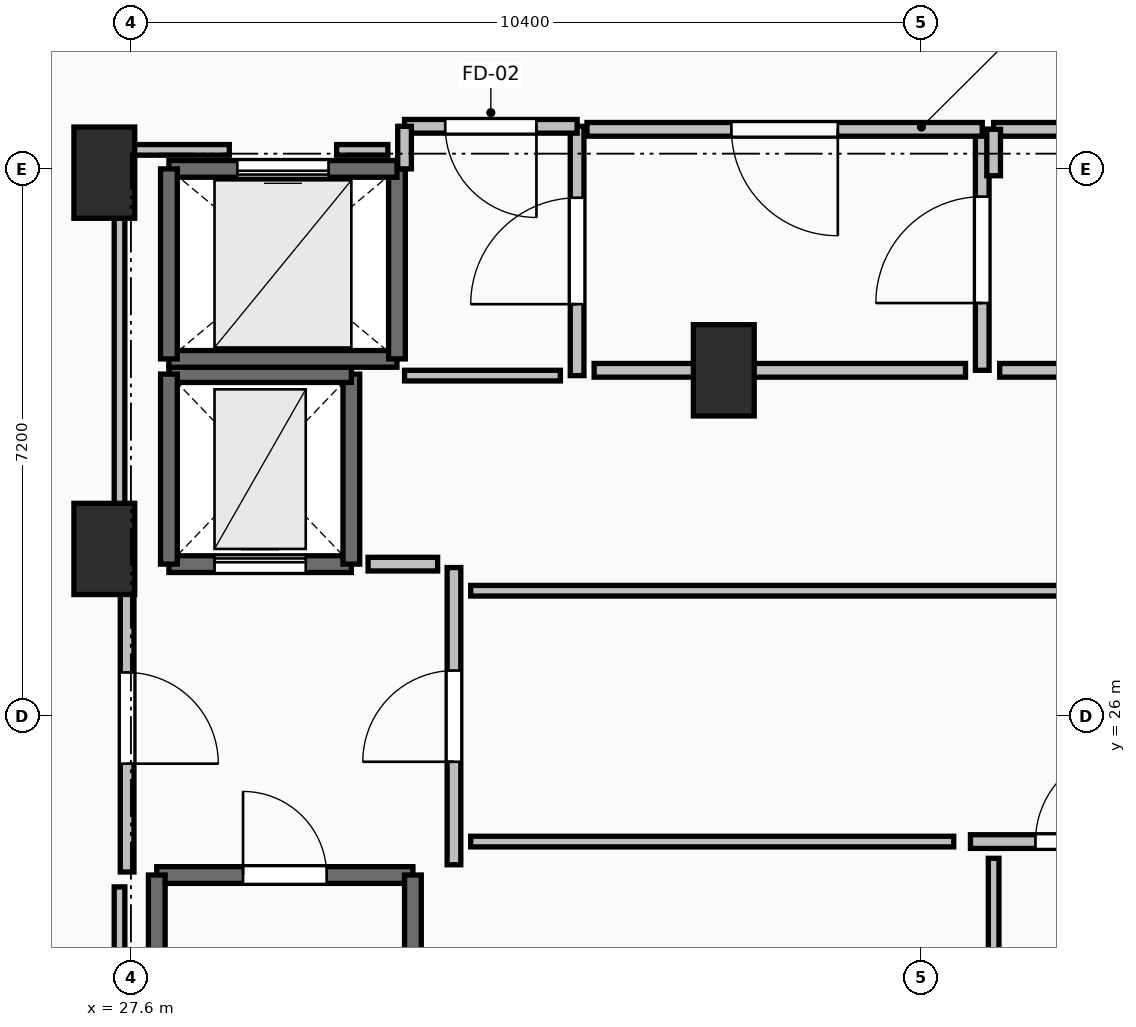
"""IFC4 building model, lengths in metres.
Left out: names, types, materials, properties, quantities, classifications, styles, units other than length and angle.
Written with IfcOpenShell. Run it as: python <this file> out.ifc"""

import sys

from ifc_helpers import new_model, si_unit, direction, frame, frame_2d, origin, origin_2d, place, context, subcontext, project, spatial, rectangle, extrude, element, fill, save


model = new_model("IFC4")
c1 = context("Model", 3, precision=1e-05, world=origin(), true_north=direction((0.0, 1.0)))
c2 = subcontext(c1, "Body", "Model", "MODEL_VIEW")
j1 = project(units=[si_unit("LENGTHUNIT", "METRE"), si_unit("PLANEANGLEUNIT", "RADIAN")], contexts=[c1])
p1 = place(None, origin())
s1 = spatial("IfcSite", under=j1, at=p1, CompositionType="ELEMENT")
p2 = place(p1, origin())
s2 = spatial("IfcBuilding", under=s1, at=p2, CompositionType="ELEMENT")
p3 = place(p2, frame((0.0, 0.0, -4.8)))
s3 = spatial("IfcBuildingStorey", under=s2, at=p3, CompositionType="ELEMENT", Elevation=-4.8)
for number, where, z_axis, x_axis in (
    (1, (27.25, 28.2, 0.0), (0.0, 0.0, 1.0), (1.0, 0.0, 0.0)),
    (2, (27.25, 33.15, 0.0), (0.0, 0.0, 1.0), (1.0, 0.0, 0.0)),
    (3, (35.4, 30.55, 0.0), (0.0, 0.0, 1.0), (1.0, 0.0, 0.0)),
):
    element("IfcColumn", number, at=place(p3, frame(where, z_axis=z_axis, x_axis=x_axis)), inside=s3, PredefinedType="PILASTER", context=c2, shape_type="SweptSolid", body=[
        extrude(rectangle(XDim=0.8, YDim=1.2, at=origin_2d()), origin(), (0.0, 0.0, 1.0), 4.8),
    ])
p4 = place(p3, frame((27.94, 23.91, 0.0), z_axis=(0.0, 0.0, 1.0), x_axis=(1.0, 0.0, 0.0)))
e4 = element("IfcWall", 4, at=p4, inside=s3, PredefinedType="SOLIDWALL", context=c2, shape_type="SweptSolid", body=[
    extrude(rectangle(XDim=3.37, YDim=0.22, at=frame_2d((1.685, 0.0))), origin(), (0.0, 0.0, 1.0), 4.46),
])
p5 = place(p4, frame((1.135, 0.0, 0.0)))
e5 = element("IfcOpeningElement", 5, at=p5, cuts=e4, PredefinedType="OPENING", context=c2, shape_type="SweptSolid", body=[
    extrude(rectangle(XDim=1.1, YDim=2.15, at=frame_2d((0.55, 1.075))), frame((0.0, 0.125, 0.0), z_axis=(0.0, -1.0, 0.0), x_axis=(1.0, 0.0, 0.0)), (0.0, 0.0, 1.0), 0.25),
])
for number, where, z_axis, x_axis in (
    (6, (31.31, 23.91, 0.0), (0.0, 0.0, 1.0), (0.0, -1.0, 0.0)),
    (7, (27.94, 16.49, 0.0), (0.0, 0.0, 1.0), (0.0, 1.0, 0.0)),
):
    element("IfcWall", number, at=place(p3, frame(where, z_axis=z_axis, x_axis=x_axis)), inside=s3, PredefinedType="SOLIDWALL", context=c2, shape_type="SweptSolid", body=[
        extrude(rectangle(XDim=7.42, YDim=0.22, at=frame_2d((3.71, 0.0))), origin(), (0.0, 0.0, 1.0), 4.46),
    ])
p6 = place(p3, frame((28.1, 28.0, 0.0), z_axis=(0.0, 0.0, 1.0), x_axis=(1.0, 0.0, 0.0)))
e8 = element("IfcWall", 8, at=p6, inside=s3, PredefinedType="SHEAR", context=c2, shape_type="SweptSolid", body=[
    extrude(rectangle(XDim=2.4, YDim=0.22, at=frame_2d((1.2, 0.0))), origin(), (0.0, 0.0, 1.0), 4.46),
])
p7 = place(p6, frame((0.6, 0.0, 0.0)))
e9 = element("IfcOpeningElement", 9, at=p7, cuts=e8, PredefinedType="OPENING", context=c2, shape_type="SweptSolid", body=[
    extrude(rectangle(XDim=1.2, YDim=2.2, at=frame_2d((0.6, 1.1))), frame((0.0, 0.125, 0.0), z_axis=(0.0, -1.0, 0.0), x_axis=(1.0, 0.0, 0.0)), (0.0, 0.0, 1.0), 0.25),
])
p8 = place(p3, frame((30.5, 28.0, 0.0), z_axis=(0.0, 0.0, 1.0), x_axis=(0.0, 1.0, 0.0)))
e10 = element("IfcWall", 10, at=p8, inside=s3, PredefinedType="SHEAR", context=c2, shape_type="SweptSolid", body=[
    extrude(rectangle(XDim=2.5, YDim=0.22, at=frame_2d((1.25, 0.0))), origin(), (0.0, 0.0, 1.0), 4.46),
])
p9 = place(p3, frame((30.5, 30.5, 0.0), z_axis=(0.0, 0.0, 1.0), x_axis=(-1.0, 0.0, 0.0)))
e11 = element("IfcWall", 11, at=p9, inside=s3, PredefinedType="SHEAR", context=c2, shape_type="SweptSolid", body=[
    extrude(rectangle(XDim=2.4, YDim=0.22, at=frame_2d((1.2, 0.0))), origin(), (0.0, 0.0, 1.0), 4.46),
])
p10 = place(p3, frame((28.1, 30.5, 0.0), z_axis=(0.0, 0.0, 1.0), x_axis=(0.0, -1.0, 0.0)))
e12 = element("IfcWall", 12, at=p10, inside=s3, PredefinedType="SHEAR", context=c2, shape_type="SweptSolid", body=[
    extrude(rectangle(XDim=2.5, YDim=0.22, at=frame_2d((1.25, 0.0))), origin(), (0.0, 0.0, 1.0), 4.46),
])
p11 = place(p3, frame((28.1, 30.7, 0.0), z_axis=(0.0, 0.0, 1.0), x_axis=(1.0, 0.0, 0.0)))
e13 = element("IfcWall", 13, at=p11, inside=s3, PredefinedType="SOLIDWALL", context=c2, shape_type="SweptSolid", body=[
    extrude(rectangle(XDim=3.0, YDim=0.22, at=frame_2d((1.5, 0.0))), origin(), (0.0, 0.0, 1.0), 4.46),
])
p12 = place(p3, frame((31.1, 30.7, 0.0), z_axis=(0.0, 0.0, 1.0), x_axis=(0.0, 1.0, 0.0)))
e14 = element("IfcWall", 14, at=p12, inside=s3, PredefinedType="SOLIDWALL", context=c2, shape_type="SweptSolid", body=[
    extrude(rectangle(XDim=2.5, YDim=0.22, at=frame_2d((1.25, 0.0))), origin(), (0.0, 0.0, 1.0), 4.46),
])
p13 = place(p3, frame((31.1, 33.2, 0.0), z_axis=(0.0, 0.0, 1.0), x_axis=(-1.0, 0.0, 0.0)))
e15 = element("IfcWall", 15, at=p13, inside=s3, PredefinedType="SOLIDWALL", context=c2, shape_type="SweptSolid", body=[
    extrude(rectangle(XDim=3.0, YDim=0.22, at=frame_2d((1.5, 0.0))), origin(), (0.0, 0.0, 1.0), 4.46),
])
p14 = place(p13, frame((0.9, 0.0, 0.0)))
e16 = element("IfcOpeningElement", 16, at=p14, cuts=e15, PredefinedType="OPENING", context=c2, shape_type="SweptSolid", body=[
    extrude(rectangle(XDim=1.2, YDim=2.2, at=frame_2d((0.6, 1.1))), frame((0.0, 0.125, 0.0), z_axis=(0.0, -1.0, 0.0), x_axis=(1.0, 0.0, 0.0)), (0.0, 0.0, 1.0), 0.25),
])
p15 = place(p3, frame((28.1, 33.2, 0.0), z_axis=(0.0, 0.0, 1.0), x_axis=(0.0, -1.0, 0.0)))
e17 = element("IfcWall", 17, at=p15, inside=s3, PredefinedType="SOLIDWALL", context=c2, shape_type="SweptSolid", body=[
    extrude(rectangle(XDim=2.5, YDim=0.22, at=frame_2d((1.25, 0.0))), origin(), (0.0, 0.0, 1.0), 4.46),
])
p16 = place(p3, frame((31.85, 24.045, 0.0), z_axis=(0.0, 0.0, 1.0), x_axis=(0.0, 1.0, 0.0)))
e18 = element("IfcWall", 18, at=p16, inside=s3, PredefinedType="PARTITIONING", context=c2, shape_type="SweptSolid", body=[
    extrude(rectangle(XDim=3.91, YDim=0.18, at=frame_2d((1.955, 0.0))), origin(), (0.0, 0.0, 1.0), 4.46),
])
p17 = place(p16, frame((1.355, 0.0, 0.0)))
e19 = element("IfcOpeningElement", 19, at=p17, cuts=e18, PredefinedType="OPENING", context=c2, shape_type="SweptSolid", body=[
    extrude(rectangle(XDim=1.2, YDim=2.15, at=frame_2d((0.6, 1.075))), frame((0.0, 0.105, 0.0), z_axis=(0.0, -1.0, 0.0), x_axis=(1.0, 0.0, 0.0)), (0.0, 0.0, 1.0), 0.21),
])
p18 = place(p3, frame((27.55, 28.0, 0.0), z_axis=(0.0, 0.0, 1.0), x_axis=(0.0, -1.0, 0.0)))
e20 = element("IfcWall", 20, at=p18, inside=s3, PredefinedType="PARTITIONING", context=c2, shape_type="SweptSolid", body=[
    extrude(rectangle(XDim=4.05, YDim=0.18, at=frame_2d((2.025, 0.0))), origin(), (0.0, 0.0, 1.0), 3.04),
])
p19 = place(p18, frame((1.425, 0.0, 0.0)))
e21 = element("IfcOpeningElement", 21, at=p19, cuts=e20, PredefinedType="OPENING", context=c2, shape_type="SweptSolid", body=[
    extrude(rectangle(XDim=1.2, YDim=2.15, at=frame_2d((0.6, 1.075))), frame((0.0, 0.105, 0.0), z_axis=(0.0, -1.0, 0.0), x_axis=(1.0, 0.0, 0.0)), (0.0, 0.0, 1.0), 0.21),
])
p20 = place(p3, frame((33.47, 30.48, 0.0), z_axis=(0.0, 0.0, 1.0), x_axis=(0.0, 1.0, 0.0)))
e22 = element("IfcWall", 22, at=p20, inside=s3, PredefinedType="PARTITIONING", context=c2, shape_type="SweptSolid", body=[
    extrude(rectangle(XDim=3.28, YDim=0.18, at=frame_2d((1.64, 0.0))), origin(), (0.0, 0.0, 1.0), 4.46),
])
p21 = place(p20, frame((0.94, 0.0, 0.0)))
e23 = element("IfcOpeningElement", 23, at=p21, cuts=e22, PredefinedType="OPENING", context=c2, shape_type="SweptSolid", body=[
    extrude(rectangle(XDim=1.4, YDim=2.2, at=frame_2d((0.7, 1.1))), frame((0.0, 0.105, 0.0), z_axis=(0.0, -1.0, 0.0), x_axis=(1.0, 0.0, 0.0)), (0.0, 0.0, 1.0), 0.21),
])
p22 = place(p3, frame((33.47, 33.76, 0.0), z_axis=(0.0, 0.0, 1.0), x_axis=(-1.0, 0.0, 0.0)))
e24 = element("IfcWall", 24, at=p22, inside=s3, PredefinedType="PARTITIONING", context=c2, shape_type="SweptSolid", body=[
    extrude(rectangle(XDim=2.27, YDim=0.18, at=frame_2d((1.135, 0.0))), origin(), (0.0, 0.0, 1.0), 4.46),
])
p23 = place(p22, frame((0.535, 0.0, 0.0)))
e25 = element("IfcOpeningElement", 25, at=p23, cuts=e24, PredefinedType="OPENING", context=c2, shape_type="SweptSolid", body=[
    extrude(rectangle(XDim=1.2, YDim=2.15, at=frame_2d((0.6, 1.075))), frame((0.0, 0.105, 0.0), z_axis=(0.0, -1.0, 0.0), x_axis=(1.0, 0.0, 0.0)), (0.0, 0.0, 1.0), 0.21),
])
p24 = place(p3, frame((31.2, 33.76, 0.0), z_axis=(0.0, 0.0, 1.0), x_axis=(0.0, -1.0, 0.0)))
e26 = element("IfcWall", 26, at=p24, inside=s3, PredefinedType="PARTITIONING", context=c2, shape_type="SweptSolid", body=[
    extrude(rectangle(XDim=0.56, YDim=0.18, at=frame_2d((0.28, 0.0))), origin(), (0.0, 0.0, 1.0), 4.46),
])
p25 = place(p3, frame((38.645, 24.35, 0.0), z_axis=(0.0, 0.0, 1.0), x_axis=(1.0, 0.0, 0.0)))
e27 = element("IfcWall", 27, at=p25, inside=s3, PredefinedType="PARTITIONING", context=c2, shape_type="SweptSolid", body=[
    extrude(rectangle(XDim=2.91, YDim=0.18, at=frame_2d((1.455, 0.0))), origin(), (0.0, 0.0, 1.0), 4.46),
])
p26 = place(p25, frame((0.855, 0.0, 0.0)))
e28 = element("IfcOpeningElement", 28, at=p26, cuts=e27, PredefinedType="OPENING", context=c2, shape_type="SweptSolid", body=[
    extrude(rectangle(XDim=1.2, YDim=2.15, at=frame_2d((0.6, 1.075))), frame((0.0, 0.105, 0.0), z_axis=(0.0, -1.0, 0.0), x_axis=(1.0, 0.0, 0.0)), (0.0, 0.0, 1.0), 0.21),
])
p27 = place(p3, frame((38.8, 30.55, 0.0), z_axis=(0.0, 0.0, 1.0), x_axis=(0.0, 1.0, 0.0)))
e29 = element("IfcWall", 29, at=p27, inside=s3, PredefinedType="PARTITIONING", context=c2, shape_type="SweptSolid", body=[
    extrude(rectangle(XDim=3.17, YDim=0.18, at=frame_2d((1.585, 0.0))), origin(), (0.0, 0.0, 1.0), 3.04),
])
p28 = place(p27, frame((0.885, 0.0, 0.0)))
e30 = element("IfcOpeningElement", 30, at=p28, cuts=e29, PredefinedType="OPENING", context=c2, shape_type="SweptSolid", body=[
    extrude(rectangle(XDim=1.4, YDim=2.2, at=frame_2d((0.7, 1.1))), frame((0.0, 0.105, 0.0), z_axis=(0.0, -1.0, 0.0), x_axis=(1.0, 0.0, 0.0)), (0.0, 0.0, 1.0), 0.21),
])
p29 = place(p3, frame((38.8, 33.72, 0.0), z_axis=(0.0, 0.0, 1.0), x_axis=(-1.0, 0.0, 0.0)))
e31 = element("IfcWall", 31, at=p29, inside=s3, PredefinedType="PARTITIONING", context=c2, shape_type="SweptSolid", body=[
    extrude(rectangle(XDim=5.2, YDim=0.18, at=frame_2d((2.6, 0.0))), origin(), (0.0, 0.0, 1.0), 4.46),
])
p30 = place(p29, frame((1.9, 0.0, 0.0)))
e32 = element("IfcOpeningElement", 32, at=p30, cuts=e31, PredefinedType="OPENING", context=c2, shape_type="SweptSolid", body=[
    extrude(rectangle(XDim=1.4, YDim=2.2, at=frame_2d((0.7, 1.1))), frame((0.0, 0.105, 0.0), z_axis=(0.0, -1.0, 0.0), x_axis=(1.0, 0.0, 0.0)), (0.0, 0.0, 1.0), 0.21),
])
p31 = place(p3, frame((44.2, 33.72, 0.0), z_axis=(0.0, 0.0, 1.0), x_axis=(-1.0, 0.0, 0.0)))
e33 = element("IfcWall", 33, at=p31, inside=s3, PredefinedType="PARTITIONING", context=c2, shape_type="SweptSolid", body=[
    extrude(rectangle(XDim=5.25, YDim=0.18, at=frame_2d((2.625, 0.0))), origin(), (0.0, 0.0, 1.0), 4.46),
])
p32 = place(p31, frame((1.925, 0.0, 0.0)))
e34 = element("IfcOpeningElement", 34, at=p32, cuts=e33, PredefinedType="OPENING", context=c2, shape_type="SweptSolid", body=[
    extrude(rectangle(XDim=1.4, YDim=2.2, at=frame_2d((0.7, 1.1))), frame((0.0, 0.105, 0.0), z_axis=(0.0, -1.0, 0.0), x_axis=(1.0, 0.0, 0.0)), (0.0, 0.0, 1.0), 0.21),
])
p33 = place(p3, frame((38.95, 33.72, 0.0), z_axis=(0.0, 0.0, 1.0), x_axis=(0.0, -1.0, 0.0)))
e35 = element("IfcWall", 35, at=p33, inside=s3, PredefinedType="PARTITIONING", context=c2, shape_type="SweptSolid", body=[
    extrude(rectangle(XDim=0.61, YDim=0.18, at=frame_2d((0.305, 0.0))), origin(), (0.0, 0.0, 1.0), 4.46),
])
p34 = place(p3, frame((31.635, 28.0, 0.0), z_axis=(0.0, 0.0, 1.0), x_axis=(-1.0, 0.0, 0.0)))
e36 = element("IfcWall", 36, at=p34, inside=s3, PredefinedType="PARTITIONING", context=c2, shape_type="SweptSolid", body=[
    extrude(rectangle(XDim=0.915, YDim=0.18, at=frame_2d((0.458, 0.0))), origin(), (0.0, 0.0, 1.0), 4.46),
])
p35 = place(p3, frame((31.2, 30.48, 0.0), z_axis=(0.0, 0.0, 1.0), x_axis=(1.0, 0.0, 0.0)))
e37 = element("IfcWall", 37, at=p35, inside=s3, PredefinedType="PARTITIONING", context=c2, shape_type="SweptSolid", body=[
    extrude(rectangle(XDim=2.05, YDim=0.14, at=frame_2d((1.025, 0.0))), origin(), (0.0, 0.0, 1.0), 4.46),
])
p36 = place(p3, frame((43.93, 27.65, 0.0), z_axis=(0.0, 0.0, 1.0), x_axis=(-1.0, 0.0, 0.0)))
e38 = element("IfcWall", 38, at=p36, inside=s3, PredefinedType="PARTITIONING", context=c2, shape_type="SweptSolid", body=[
    extrude(rectangle(XDim=11.86, YDim=0.14, at=frame_2d((5.93, 0.0))), origin(), (0.0, 0.0, 1.0), 4.46),
])
p37 = place(p3, frame((32.07, 24.35, 0.0), z_axis=(0.0, 0.0, 1.0), x_axis=(1.0, 0.0, 0.0)))
e39 = element("IfcWall", 39, at=p37, inside=s3, PredefinedType="PARTITIONING", context=c2, shape_type="SweptSolid", body=[
    extrude(rectangle(XDim=6.355, YDim=0.14, at=frame_2d((3.177, 0.0))), origin(), (0.0, 0.0, 1.0), 4.46),
])
p38 = place(p3, frame((38.95, 24.13, 0.0), z_axis=(0.0, 0.0, 1.0), x_axis=(0.0, -1.0, 0.0)))
e40 = element("IfcWall", 40, at=p38, inside=s3, PredefinedType="PARTITIONING", context=c2, shape_type="SweptSolid", body=[
    extrude(rectangle(XDim=2.155, YDim=0.14, at=frame_2d((1.077, 0.0))), origin(), (0.0, 0.0, 1.0), 4.46),
])
p39 = place(p3, frame((33.694, 30.55, 0.0), z_axis=(0.0, 0.0, 1.0), x_axis=(1.0, 0.0, 0.0)))
e41 = element("IfcWall", 41, at=p39, inside=s3, PredefinedType="PARTITIONING", context=c2, shape_type="SweptSolid", body=[
    extrude(rectangle(XDim=4.886, YDim=0.18, at=frame_2d((2.443, 0.0))), origin(), (0.0, 0.0, 1.0), 3.04),
])
p40 = place(p3, frame((39.03, 30.55, 0.0), z_axis=(0.0, 0.0, 1.0), x_axis=(1.0, 0.0, 0.0)))
e42 = element("IfcWall", 42, at=p40, inside=s3, PredefinedType="PARTITIONING", context=c2, shape_type="SweptSolid", body=[
    extrude(rectangle(XDim=5.17, YDim=0.18, at=frame_2d((2.585, 0.0))), origin(), (0.0, 0.0, 1.0), 3.04),
])
p41 = place(p3, frame((27.45, 16.24, 0.0), z_axis=(0.0, 0.0, 1.0), x_axis=(0.0, 1.0, 0.0)))
e43 = element("IfcWall", 43, at=p41, inside=s3, PredefinedType="PARTITIONING", context=c2, shape_type="SweptSolid", body=[
    extrude(rectangle(XDim=7.514, YDim=0.14, at=frame_2d((3.757, 0.0))), origin(), (0.0, 0.0, 1.0), 3.04),
])
p42 = place(p3, frame((27.45, 28.196, 0.0), z_axis=(0.0, 0.0, 1.0), x_axis=(0.0, 1.0, 0.0)))
e44 = element("IfcWall", 44, at=p42, inside=s3, PredefinedType="PARTITIONING", context=c2, shape_type="SweptSolid", body=[
    extrude(rectangle(XDim=5.254, YDim=0.14, at=frame_2d((2.627, 0.0))), origin(), (0.0, 0.0, 1.0), 3.04),
])
p43 = place(p3, frame((27.45, 33.45, 0.0), z_axis=(0.0, 0.0, 1.0), x_axis=(1.0, 0.0, 0.0)))
e45 = element("IfcWall", 45, at=p43, inside=s3, PredefinedType="PARTITIONING", context=c2, shape_type="SweptSolid", body=[
    extrude(rectangle(XDim=1.444, YDim=0.14, at=frame_2d((0.722, 0.0))), origin(), (0.0, 0.0, 1.0), 4.46),
])
p44 = place(p3, frame((30.306, 33.45, 0.0), z_axis=(0.0, 0.0, 1.0), x_axis=(1.0, 0.0, 0.0)))
e46 = element("IfcWall", 46, at=p44, inside=s3, PredefinedType="PARTITIONING", context=c2, shape_type="SweptSolid", body=[
    extrude(rectangle(XDim=0.674, YDim=0.14, at=frame_2d((0.337, 0.0))), origin(), (0.0, 0.0, 1.0), 4.46),
])
p45 = place(p5, origin())
e47 = element("IfcDoor", 47, at=p45, inside=s3, OperationType="SINGLE_SWING_LEFT", PredefinedType="DOOR", context=c2, shape_type="SweptSolid", body=[
    extrude(rectangle(XDim=1.1, YDim=2.15, at=frame_2d((0.55, 1.075))), frame((0.0, 0.025, 0.0), z_axis=(0.0, -1.0, 0.0), x_axis=(1.0, 0.0, 0.0)), (0.0, 0.0, 1.0), 0.05),
])
fill(e5, e47)
p46 = place(p7, origin())
e48 = element("IfcDoor", 48, at=p46, inside=s3, OperationType="SLIDING_TO_LEFT", PredefinedType="DOOR", context=c2, shape_type="SweptSolid", body=[
    extrude(rectangle(XDim=1.2, YDim=2.2, at=frame_2d((0.6, 1.1))), frame((0.0, 0.025, 0.0), z_axis=(0.0, -1.0, 0.0), x_axis=(1.0, 0.0, 0.0)), (0.0, 0.0, 1.0), 0.05),
])
fill(e9, e48)
p47 = place(p14, origin())
e49 = element("IfcDoor", 49, at=p47, inside=s3, OperationType="SLIDING_TO_LEFT", PredefinedType="DOOR", context=c2, shape_type="SweptSolid", body=[
    extrude(rectangle(XDim=1.2, YDim=2.2, at=frame_2d((0.6, 1.1))), frame((0.0, 0.025, 0.0), z_axis=(0.0, -1.0, 0.0), x_axis=(1.0, 0.0, 0.0)), (0.0, 0.0, 1.0), 0.05),
])
fill(e16, e49)
p48 = place(p17, origin())
e50 = element("IfcDoor", 50, at=p48, inside=s3, OperationType="SINGLE_SWING_LEFT", PredefinedType="DOOR", context=c2, shape_type="SweptSolid", body=[
    extrude(rectangle(XDim=1.2, YDim=2.15, at=frame_2d((0.6, 1.075))), frame((0.0, 0.025, 0.0), z_axis=(0.0, -1.0, 0.0), x_axis=(1.0, 0.0, 0.0)), (0.0, 0.0, 1.0), 0.05),
])
fill(e19, e50)
p49 = place(p19, origin())
e51 = element("IfcDoor", 51, at=p49, inside=s3, OperationType="SINGLE_SWING_RIGHT", PredefinedType="DOOR", context=c2, shape_type="SweptSolid", body=[
    extrude(rectangle(XDim=1.2, YDim=2.15, at=frame_2d((0.6, 1.075))), frame((0.0, 0.025, 0.0), z_axis=(0.0, -1.0, 0.0), x_axis=(1.0, 0.0, 0.0)), (0.0, 0.0, 1.0), 0.05),
])
fill(e21, e51)
p50 = place(p21, origin())
e52 = element("IfcDoor", 52, at=p50, inside=s3, OperationType="DOUBLE_SWING_LEFT", PredefinedType="DOOR", context=c2, shape_type="SweptSolid", body=[
    extrude(rectangle(XDim=1.4, YDim=2.2, at=frame_2d((0.7, 1.1))), frame((0.0, 0.025, 0.0), z_axis=(0.0, -1.0, 0.0), x_axis=(1.0, 0.0, 0.0)), (0.0, 0.0, 1.0), 0.05),
])
fill(e23, e52)
p51 = place(p23, origin())
e53 = element("IfcDoor", 53, at=p51, inside=s3, OperationType="SINGLE_SWING_LEFT", PredefinedType="DOOR", context=c2, shape_type="SweptSolid", body=[
    extrude(rectangle(XDim=1.2, YDim=2.15, at=frame_2d((0.6, 1.075))), frame((0.0, 0.025, 0.0), z_axis=(0.0, -1.0, 0.0), x_axis=(1.0, 0.0, 0.0)), (0.0, 0.0, 1.0), 0.05),
])
fill(e25, e53)
p52 = place(p26, origin())
e54 = element("IfcDoor", 54, at=p52, inside=s3, OperationType="SINGLE_SWING_RIGHT", PredefinedType="DOOR", context=c2, shape_type="SweptSolid", body=[
    extrude(rectangle(XDim=1.2, YDim=2.15, at=frame_2d((0.6, 1.075))), frame((0.0, 0.025, 0.0), z_axis=(0.0, -1.0, 0.0), x_axis=(1.0, 0.0, 0.0)), (0.0, 0.0, 1.0), 0.05),
])
fill(e28, e54)
p53 = place(p28, origin())
e55 = element("IfcDoor", 55, at=p53, inside=s3, OperationType="DOUBLE_SWING_LEFT", PredefinedType="DOOR", context=c2, shape_type="SweptSolid", body=[
    extrude(rectangle(XDim=1.4, YDim=2.2, at=frame_2d((0.7, 1.1))), frame((0.0, 0.025, 0.0), z_axis=(0.0, -1.0, 0.0), x_axis=(1.0, 0.0, 0.0)), (0.0, 0.0, 1.0), 0.05),
])
fill(e30, e55)
p54 = place(p30, origin())
e56 = element("IfcDoor", 56, at=p54, inside=s3, OperationType="DOUBLE_SWING_LEFT", PredefinedType="DOOR", context=c2, shape_type="SweptSolid", body=[
    extrude(rectangle(XDim=1.4, YDim=2.2, at=frame_2d((0.7, 1.1))), frame((0.0, 0.025, 0.0), z_axis=(0.0, -1.0, 0.0), x_axis=(1.0, 0.0, 0.0)), (0.0, 0.0, 1.0), 0.05),
])
fill(e32, e56)
save(model, sys.argv[1])
